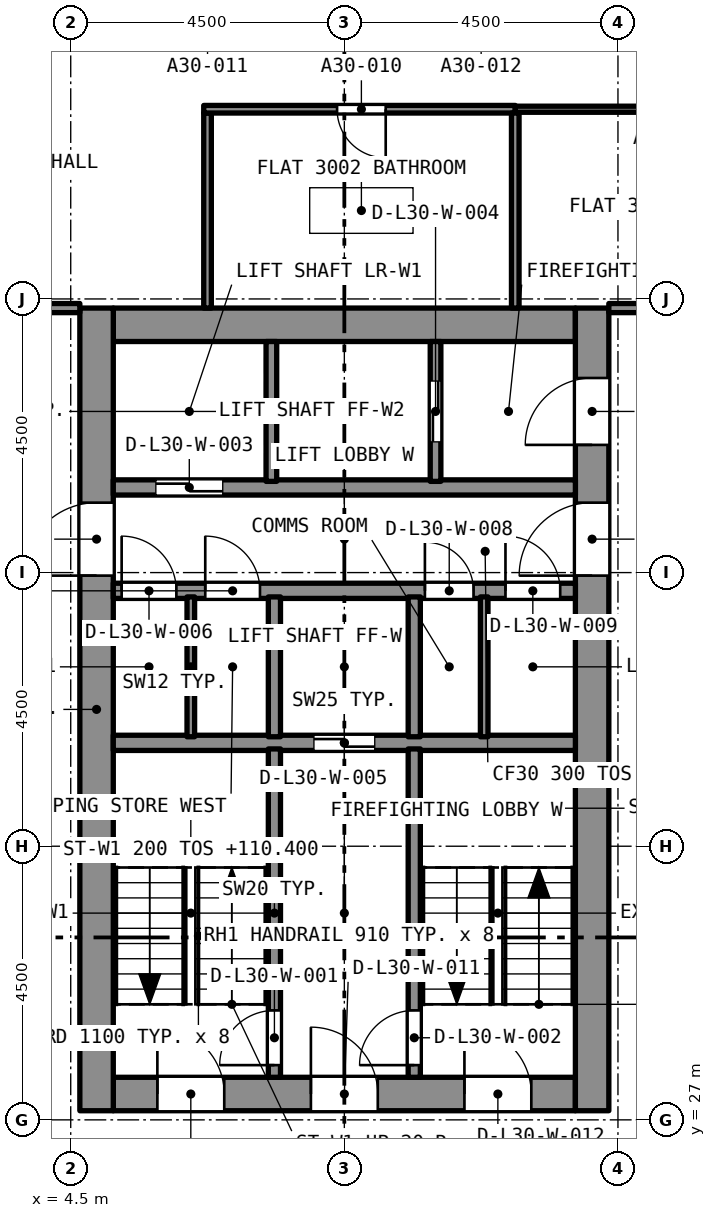
"""IFC4 building model, lengths in metres.
Left out: names, types, materials, properties, quantities, classifications, styles, units other than length and angle.
Written with IfcOpenShell. Run it as: python <this file> out.ifc"""

import sys

from ifc_helpers import new_model, si_unit, direction, frame, frame_2d, origin, place, context, subcontext, project, spatial, rectangle, extrude, element, fill, save


model = new_model("IFC4")
c1 = context("Model", 3, precision=1e-05, world=origin(), true_north=direction((0.0, 1.0)))
c2 = subcontext(c1, "Body", "Model", "MODEL_VIEW")
j1 = project(units=[si_unit("LENGTHUNIT", "METRE"), si_unit("PLANEANGLEUNIT", "RADIAN")], contexts=[c1])
p1 = place(None, origin())
s1 = spatial("IfcSite", under=j1, at=p1, CompositionType="ELEMENT")
p2 = place(p1, origin())
s2 = spatial("IfcBuilding", under=s1, at=p2, CompositionType="ELEMENT")
p3 = place(p2, frame((0.0, 0.0, 108.8)))
s3 = spatial("IfcBuildingStorey", under=s2, at=p3, CompositionType="ELEMENT", Elevation=108.8)
p4 = place(p3, frame((5.2, 27.425, 0.0), z_axis=(0.0, 0.0, 1.0), x_axis=(1.0, 0.0, 0.0)))
e1 = element("IfcWall", 1, at=p4, inside=s3, PredefinedType="SOLIDWALL", context=c2, shape_type="SweptSolid", body=[
    extrude(rectangle(XDim=7.6, YDim=0.55, at=frame_2d((3.8, 0.0))), origin(), (0.0, 0.0, 1.0), 3.2),
])
p5 = place(p4, frame((0.725, 0.0, 0.0)))
e2 = element("IfcOpeningElement", 2, at=p5, cuts=e1, PredefinedType="OPENING", context=c2, shape_type="SweptSolid", body=[
    extrude(rectangle(XDim=1.1, YDim=2.1, at=frame_2d((0.55, 1.05))), frame((0.0, 0.285, 0.0), z_axis=(0.0, -1.0, 0.0), x_axis=(1.0, 0.0, 0.0)), (0.0, 0.0, 1.0), 0.57),
])
p6 = place(p4, frame((3.25, 0.0, 0.0)))
e3 = element("IfcOpeningElement", 3, at=p6, cuts=e1, PredefinedType="OPENING", context=c2, shape_type="SweptSolid", body=[
    extrude(rectangle(XDim=1.1, YDim=2.1, at=frame_2d((0.55, 1.05))), frame((0.0, 0.285, 0.0), z_axis=(0.0, -1.0, 0.0), x_axis=(1.0, 0.0, 0.0)), (0.0, 0.0, 1.0), 0.57),
])
p7 = place(p4, frame((5.775, 0.0, 0.0)))
e4 = element("IfcOpeningElement", 4, at=p7, cuts=e1, PredefinedType="OPENING", context=c2, shape_type="SweptSolid", body=[
    extrude(rectangle(XDim=1.1, YDim=2.1, at=frame_2d((0.55, 1.05))), frame((0.0, 0.285, 0.0), z_axis=(0.0, -1.0, 0.0), x_axis=(1.0, 0.0, 0.0)), (0.0, 0.0, 1.0), 0.57),
])
p8 = place(p3, frame((5.2, 40.075, 0.0), z_axis=(0.0, 0.0, 1.0), x_axis=(1.0, 0.0, 0.0)))
e5 = element("IfcWall", 5, at=p8, inside=s3, PredefinedType="SOLIDWALL", context=c2, shape_type="SweptSolid", body=[
    extrude(rectangle(XDim=7.6, YDim=0.55, at=frame_2d((3.8, 0.0))), origin(), (0.0, 0.0, 1.0), 3.2),
])
p9 = place(p3, frame((4.925, 27.15, 0.0), z_axis=(0.0, 0.0, 1.0), x_axis=(0.0, 1.0, 0.0)))
e6 = element("IfcWall", 6, at=p9, inside=s3, PredefinedType="SOLIDWALL", context=c2, shape_type="SweptSolid", body=[
    extrude(rectangle(XDim=13.2, YDim=0.55, at=frame_2d((6.6, 0.0))), origin(), (0.0, 0.0, 1.0), 3.2),
])
p10 = place(p9, frame((8.8, 0.0, 0.0)))
e7 = element("IfcOpeningElement", 7, at=p10, cuts=e6, PredefinedType="OPENING", context=c2, shape_type="SweptSolid", body=[
    extrude(rectangle(XDim=1.2, YDim=2.1, at=frame_2d((0.6, 1.05))), frame((0.0, 0.285, 0.0), z_axis=(0.0, -1.0, 0.0), x_axis=(1.0, 0.0, 0.0)), (0.0, 0.0, 1.0), 0.57),
])
p11 = place(p3, frame((13.075, 27.15, 0.0), z_axis=(0.0, 0.0, 1.0), x_axis=(0.0, 1.0, 0.0)))
e8 = element("IfcWall", 8, at=p11, inside=s3, PredefinedType="SOLIDWALL", context=c2, shape_type="SweptSolid", body=[
    extrude(rectangle(XDim=13.2, YDim=0.55, at=frame_2d((6.6, 0.0))), origin(), (0.0, 0.0, 1.0), 3.2),
])
p12 = place(p11, frame((10.95, 0.0, 0.0)))
e9 = element("IfcOpeningElement", 9, at=p12, cuts=e8, PredefinedType="OPENING", context=c2, shape_type="SweptSolid", body=[
    extrude(rectangle(XDim=1.1, YDim=2.1, at=frame_2d((0.55, 1.05))), frame((0.0, 0.285, 0.0), z_axis=(0.0, -1.0, 0.0), x_axis=(1.0, 0.0, 0.0)), (0.0, 0.0, 1.0), 0.57),
])
p13 = place(p11, frame((8.8, 0.0, 0.0)))
e10 = element("IfcOpeningElement", 10, at=p13, cuts=e8, PredefinedType="OPENING", context=c2, shape_type="SweptSolid", body=[
    extrude(rectangle(XDim=1.2, YDim=2.1, at=frame_2d((0.6, 1.05))), frame((0.0, 0.285, 0.0), z_axis=(0.0, -1.0, 0.0), x_axis=(1.0, 0.0, 0.0)), (0.0, 0.0, 1.0), 0.57),
])
p14 = place(p3, frame((6.75, 40.35, 0.0), z_axis=(0.0, 0.0, 1.0), x_axis=(0.0, 1.0, 0.0)))
e11 = element("IfcWall", 11, at=p14, inside=s3, PredefinedType="PARTITIONING", context=c2, shape_type="SweptSolid", body=[
    extrude(rectangle(XDim=3.208, YDim=0.125, at=frame_2d((1.604, 0.0))), origin(), (0.0, 0.0, 1.0), 2.9),
])
p15 = place(p3, frame((11.811, 43.62, 0.0), z_axis=(0.0, 0.0, 1.0), x_axis=(-1.0, 0.0, 0.0)))
e12 = element("IfcWall", 12, at=p15, inside=s3, PredefinedType="PARTITIONING", context=c2, shape_type="SweptSolid", body=[
    extrude(rectangle(XDim=5.123, YDim=0.125, at=frame_2d((2.562, 0.0))), origin(), (0.0, 0.0, 1.0), 2.9),
])
p16 = place(p15, frame((2.13, 0.0, 0.0)))
e13 = element("IfcOpeningElement", 13, at=p16, cuts=e12, PredefinedType="OPENING", context=c2, shape_type="SweptSolid", body=[
    extrude(rectangle(XDim=0.8, YDim=2.1, at=frame_2d((0.4, 1.05))), frame((0.0, 0.073, 0.0), z_axis=(0.0, -1.0, 0.0), x_axis=(1.0, 0.0, 0.0)), (0.0, 0.0, 1.0), 0.145),
])
p17 = place(p3, frame((11.811, 40.35, 0.0), z_axis=(0.0, 0.0, 1.0), x_axis=(0.0, 1.0, 0.0)))
e14 = element("IfcWall", 14, at=p17, inside=s3, PredefinedType="PARTITIONING", context=c2, shape_type="SweptSolid", body=[
    extrude(rectangle(XDim=3.208, YDim=0.125, at=frame_2d((1.604, 0.0))), origin(), (0.0, 0.0, 1.0), 2.9),
])
p18 = place(p3, frame((17.875, 43.62, 0.0), z_axis=(0.0, 0.0, 1.0), x_axis=(-1.0, 0.0, 0.0)))
e15 = element("IfcWall", 15, at=p18, inside=s3, PredefinedType="PARTITIONING", context=c2, shape_type="SweptSolid", body=[
    extrude(rectangle(XDim=6.064, YDim=0.1, at=frame_2d((3.032, 0.0))), origin(), (0.0, 0.0, 1.0), 2.9),
])
p19 = place(p18, frame((2.52, 0.0, 0.0)))
e16 = element("IfcOpeningElement", 16, at=p19, cuts=e15, PredefinedType="OPENING", context=c2, shape_type="SweptSolid", body=[
    extrude(rectangle(XDim=0.9, YDim=2.1, at=frame_2d((0.45, 1.05))), frame((0.0, 0.06, 0.0), z_axis=(0.0, -1.0, 0.0), x_axis=(1.0, 0.0, 0.0)), (0.0, 0.0, 1.0), 0.12),
])
p20 = place(p3, frame((0.575, 40.35, 0.0), z_axis=(0.0, 0.0, 1.0), x_axis=(1.0, 0.0, 0.0)))
e17 = element("IfcWall", 17, at=p20, inside=s3, PredefinedType="PARTITIONING", context=c2, shape_type="SweptSolid", body=[
    extrude(rectangle(XDim=4.075, YDim=0.15, at=frame_2d((2.038, 0.0))), origin(), (0.0, 0.0, 1.0), 2.9),
])
p21 = place(p20, frame((1.175, 0.0, 0.0)))
e18 = element("IfcOpeningElement", 18, at=p21, cuts=e17, PredefinedType="OPENING", context=c2, shape_type="SweptSolid", body=[
    extrude(rectangle(XDim=1.0, YDim=2.1, at=frame_2d((0.5, 1.05))), frame((0.0, 0.085, 0.0), z_axis=(0.0, -1.0, 0.0), x_axis=(1.0, 0.0, 0.0)), (0.0, 0.0, 1.0), 0.17),
])
p22 = place(p3, frame((13.35, 40.35, 0.0), z_axis=(0.0, 0.0, 1.0), x_axis=(1.0, 0.0, 0.0)))
e19 = element("IfcWall", 19, at=p22, inside=s3, PredefinedType="PARTITIONING", context=c2, shape_type="SweptSolid", body=[
    extrude(rectangle(XDim=4.075, YDim=0.15, at=frame_2d((2.038, 0.0))), origin(), (0.0, 0.0, 1.0), 2.9),
])
p23 = place(p3, frame((5.2, 33.2, 0.0), z_axis=(0.0, 0.0, 1.0), x_axis=(1.0, 0.0, 0.0)))
e20 = element("IfcWall", 20, at=p23, inside=s3, PredefinedType="SOLIDWALL", context=c2, shape_type="SweptSolid", body=[
    extrude(rectangle(XDim=7.6, YDim=0.25, at=frame_2d((3.8, 0.0))), origin(), (0.0, 0.0, 1.0), 2.9),
])
p24 = place(p23, frame((3.3, 0.0, 0.0)))
e21 = element("IfcOpeningElement", 21, at=p24, cuts=e20, PredefinedType="OPENING", context=c2, shape_type="SweptSolid", body=[
    extrude(rectangle(XDim=1.0, YDim=2.1, at=frame_2d((0.5, 1.05))), frame((0.0, 0.135, 0.0), z_axis=(0.0, -1.0, 0.0), x_axis=(1.0, 0.0, 0.0)), (0.0, 0.0, 1.0), 0.27),
])
p25 = place(p3, frame((5.2, 35.7, 0.0), z_axis=(0.0, 0.0, 1.0), x_axis=(1.0, 0.0, 0.0)))
e22 = element("IfcWall", 22, at=p25, inside=s3, PredefinedType="SOLIDWALL", context=c2, shape_type="SweptSolid", body=[
    extrude(rectangle(XDim=7.6, YDim=0.25, at=frame_2d((3.8, 0.0))), origin(), (0.0, 0.0, 1.0), 2.9),
])
p26 = place(p25, frame((0.137, 0.0, 0.0)))
e23 = element("IfcOpeningElement", 23, at=p26, cuts=e22, PredefinedType="OPENING", context=c2, shape_type="SweptSolid", body=[
    extrude(rectangle(XDim=0.9, YDim=2.1, at=frame_2d((0.45, 1.05))), frame((0.0, 0.135, 0.0), z_axis=(0.0, -1.0, 0.0), x_axis=(1.0, 0.0, 0.0)), (0.0, 0.0, 1.0), 0.27),
])
p27 = place(p25, frame((1.512, 0.0, 0.0)))
e24 = element("IfcOpeningElement", 24, at=p27, cuts=e22, PredefinedType="OPENING", context=c2, shape_type="SweptSolid", body=[
    extrude(rectangle(XDim=0.9, YDim=2.1, at=frame_2d((0.45, 1.05))), frame((0.0, 0.135, 0.0), z_axis=(0.0, -1.0, 0.0), x_axis=(1.0, 0.0, 0.0)), (0.0, 0.0, 1.0), 0.27),
])
p28 = place(p25, frame((5.125, 0.0, 0.0)))
e25 = element("IfcOpeningElement", 25, at=p28, cuts=e22, PredefinedType="OPENING", context=c2, shape_type="SweptSolid", body=[
    extrude(rectangle(XDim=0.8, YDim=2.1, at=frame_2d((0.4, 1.05))), frame((0.0, 0.135, 0.0), z_axis=(0.0, -1.0, 0.0), x_axis=(1.0, 0.0, 0.0)), (0.0, 0.0, 1.0), 0.27),
])
p29 = place(p25, frame((6.45, 0.0, 0.0)))
e26 = element("IfcOpeningElement", 26, at=p29, cuts=e22, PredefinedType="OPENING", context=c2, shape_type="SweptSolid", body=[
    extrude(rectangle(XDim=0.9, YDim=2.1, at=frame_2d((0.45, 1.05))), frame((0.0, 0.135, 0.0), z_axis=(0.0, -1.0, 0.0), x_axis=(1.0, 0.0, 0.0)), (0.0, 0.0, 1.0), 0.27),
])
p30 = place(p3, frame((5.2, 37.4, 0.0), z_axis=(0.0, 0.0, 1.0), x_axis=(1.0, 0.0, 0.0)))
e27 = element("IfcWall", 27, at=p30, inside=s3, PredefinedType="SOLIDWALL", context=c2, shape_type="SweptSolid", body=[
    extrude(rectangle(XDim=7.6, YDim=0.25, at=frame_2d((3.8, 0.0))), origin(), (0.0, 0.0, 1.0), 2.9),
])
p31 = place(p30, frame((0.7, 0.0, 0.0)))
e28 = element("IfcOpeningElement", 28, at=p31, cuts=e27, PredefinedType="OPENING", context=c2, shape_type="SweptSolid", body=[
    extrude(rectangle(XDim=1.1, YDim=2.4, at=frame_2d((0.55, 1.2))), frame((0.0, 0.135, 0.0), z_axis=(0.0, -1.0, 0.0), x_axis=(1.0, 0.0, 0.0)), (0.0, 0.0, 1.0), 0.27),
])
p32 = place(p3, frame((7.85, 27.7, 0.0), z_axis=(0.0, 0.0, 1.0), x_axis=(0.0, 1.0, 0.0)))
e29 = element("IfcWall", 29, at=p32, inside=s3, PredefinedType="SOLIDWALL", context=c2, shape_type="SweptSolid", body=[
    extrude(rectangle(XDim=5.4, YDim=0.2, at=frame_2d((2.7, 0.0))), origin(), (0.0, 0.0, 1.0), 2.9),
])
p33 = place(p32, frame((0.2, 0.0, 0.0)))
e30 = element("IfcOpeningElement", 30, at=p33, cuts=e29, PredefinedType="OPENING", context=c2, shape_type="SweptSolid", body=[
    extrude(rectangle(XDim=0.9, YDim=2.1, at=frame_2d((0.45, 1.05))), frame((0.0, 0.11, 0.0), z_axis=(0.0, -1.0, 0.0), x_axis=(1.0, 0.0, 0.0)), (0.0, 0.0, 1.0), 0.22),
])
p34 = place(p3, frame((10.15, 27.7, 0.0), z_axis=(0.0, 0.0, 1.0), x_axis=(0.0, 1.0, 0.0)))
e31 = element("IfcWall", 31, at=p34, inside=s3, PredefinedType="SOLIDWALL", context=c2, shape_type="SweptSolid", body=[
    extrude(rectangle(XDim=5.4, YDim=0.2, at=frame_2d((2.7, 0.0))), origin(), (0.0, 0.0, 1.0), 2.9),
])
p35 = place(p34, frame((0.2, 0.0, 0.0)))
e32 = element("IfcOpeningElement", 32, at=p35, cuts=e31, PredefinedType="OPENING", context=c2, shape_type="SweptSolid", body=[
    extrude(rectangle(XDim=0.9, YDim=2.1, at=frame_2d((0.45, 1.05))), frame((0.0, 0.11, 0.0), z_axis=(0.0, -1.0, 0.0), x_axis=(1.0, 0.0, 0.0)), (0.0, 0.0, 1.0), 0.22),
])
for number, where, z_axis, x_axis in (
    (33, (7.85, 33.3, 0.0), (0.0, 0.0, 1.0), (0.0, 1.0, 0.0)),
    (34, (10.15, 33.3, 0.0), (0.0, 0.0, 1.0), (0.0, 1.0, 0.0)),
):
    element("IfcWall", number, at=place(p3, frame(where, z_axis=z_axis, x_axis=x_axis)), inside=s3, PredefinedType="SOLIDWALL", context=c2, shape_type="SweptSolid", body=[
        extrude(rectangle(XDim=2.3, YDim=0.2, at=frame_2d((1.15, 0.0))), origin(), (0.0, 0.0, 1.0), 2.9),
    ])
p36 = place(p3, frame((7.8, 37.5, 0.0), z_axis=(0.0, 0.0, 1.0), x_axis=(0.0, 1.0, 0.0)))
e35 = element("IfcWall", 35, at=p36, inside=s3, PredefinedType="SOLIDWALL", context=c2, shape_type="SweptSolid", body=[
    extrude(rectangle(XDim=2.3, YDim=0.175, at=frame_2d((1.15, 0.0))), origin(), (0.0, 0.0, 1.0), 2.9),
])
p37 = place(p3, frame((10.5, 37.5, 0.0), z_axis=(0.0, 0.0, 1.0), x_axis=(0.0, 1.0, 0.0)))
e36 = element("IfcWall", 36, at=p37, inside=s3, PredefinedType="SOLIDWALL", context=c2, shape_type="SweptSolid", body=[
    extrude(rectangle(XDim=2.3, YDim=0.175, at=frame_2d((1.15, 0.0))), origin(), (0.0, 0.0, 1.0), 2.9),
])
p38 = place(p37, frame((0.65, 0.0, 0.0)))
e37 = element("IfcOpeningElement", 37, at=p38, cuts=e36, PredefinedType="OPENING", context=c2, shape_type="SweptSolid", body=[
    extrude(rectangle(XDim=1.0, YDim=2.1, at=frame_2d((0.5, 1.05))), frame((0.0, 0.097, 0.0), z_axis=(0.0, -1.0, 0.0), x_axis=(1.0, 0.0, 0.0)), (0.0, 0.0, 1.0), 0.195),
])
for number, where, z_axis, x_axis in (
    (38, (6.475, 33.3, 0.0), (0.0, 0.0, 1.0), (0.0, 1.0, 0.0)),
    (39, (11.3, 33.3, 0.0), (0.0, 0.0, 1.0), (0.0, 1.0, 0.0)),
):
    element("IfcWall", number, at=place(p3, frame(where, z_axis=z_axis, x_axis=x_axis)), inside=s3, PredefinedType="PARTITIONING", context=c2, shape_type="SweptSolid", body=[
        extrude(rectangle(XDim=2.3, YDim=0.125, at=frame_2d((1.15, 0.0))), origin(), (0.0, 0.0, 1.0), 2.9),
    ])
p39 = place(p16, origin())
e40 = element("IfcDoor", 40, at=p39, inside=s3, OperationType="SINGLE_SWING_LEFT", PredefinedType="DOOR", context=c2, shape_type="SweptSolid", body=[
    extrude(rectangle(XDim=0.8, YDim=2.1, at=frame_2d((0.4, 1.05))), frame((0.0, 0.025, 0.0), z_axis=(0.0, -1.0, 0.0), x_axis=(1.0, 0.0, 0.0)), (0.0, 0.0, 1.0), 0.05),
])
fill(e13, e40)
p40 = place(p33, origin())
e41 = element("IfcDoor", 41, at=p40, inside=s3, OperationType="SINGLE_SWING_LEFT", PredefinedType="DOOR", context=c2, shape_type="SweptSolid", body=[
    extrude(rectangle(XDim=0.9, YDim=2.1, at=frame_2d((0.45, 1.05))), frame((0.0, 0.025, 0.0), z_axis=(0.0, -1.0, 0.0), x_axis=(1.0, 0.0, 0.0)), (0.0, 0.0, 1.0), 0.05),
])
fill(e30, e41)
p41 = place(p35, origin())
e42 = element("IfcDoor", 42, at=p41, inside=s3, OperationType="SINGLE_SWING_LEFT", PredefinedType="DOOR", context=c2, shape_type="SweptSolid", body=[
    extrude(rectangle(XDim=0.9, YDim=2.1, at=frame_2d((0.45, 1.05))), frame((0.0, 0.025, 0.0), z_axis=(0.0, -1.0, 0.0), x_axis=(1.0, 0.0, 0.0)), (0.0, 0.0, 1.0), 0.05),
])
fill(e32, e42)
p42 = place(p31, origin())
e43 = element("IfcDoor", 43, at=p42, inside=s3, OperationType="SLIDING_TO_LEFT", PredefinedType="DOOR", context=c2, shape_type="SweptSolid", body=[
    extrude(rectangle(XDim=1.1, YDim=2.4, at=frame_2d((0.55, 1.2))), frame((0.0, 0.025, 0.0), z_axis=(0.0, -1.0, 0.0), x_axis=(1.0, 0.0, 0.0)), (0.0, 0.0, 1.0), 0.05),
])
fill(e28, e43)
p43 = place(p38, origin())
e44 = element("IfcDoor", 44, at=p43, inside=s3, OperationType="SLIDING_TO_LEFT", PredefinedType="DOOR", context=c2, shape_type="SweptSolid", body=[
    extrude(rectangle(XDim=1.0, YDim=2.1, at=frame_2d((0.5, 1.05))), frame((0.0, 0.025, 0.0), z_axis=(0.0, -1.0, 0.0), x_axis=(1.0, 0.0, 0.0)), (0.0, 0.0, 1.0), 0.05),
])
fill(e37, e44)
p44 = place(p24, origin())
e45 = element("IfcDoor", 45, at=p44, inside=s3, OperationType="SLIDING_TO_LEFT", PredefinedType="DOOR", context=c2, shape_type="SweptSolid", body=[
    extrude(rectangle(XDim=1.0, YDim=2.1, at=frame_2d((0.5, 1.05))), frame((0.0, 0.025, 0.0), z_axis=(0.0, -1.0, 0.0), x_axis=(1.0, 0.0, 0.0)), (0.0, 0.0, 1.0), 0.05),
])
fill(e21, e45)
p45 = place(p26, origin())
e46 = element("IfcDoor", 46, at=p45, inside=s3, OperationType="SINGLE_SWING_LEFT", PredefinedType="DOOR", context=c2, shape_type="SweptSolid", body=[
    extrude(rectangle(XDim=0.9, YDim=2.1, at=frame_2d((0.45, 1.05))), frame((0.0, 0.025, 0.0), z_axis=(0.0, -1.0, 0.0), x_axis=(1.0, 0.0, 0.0)), (0.0, 0.0, 1.0), 0.05),
])
fill(e23, e46)
p46 = place(p27, origin())
e47 = element("IfcDoor", 47, at=p46, inside=s3, OperationType="SINGLE_SWING_LEFT", PredefinedType="DOOR", context=c2, shape_type="SweptSolid", body=[
    extrude(rectangle(XDim=0.9, YDim=2.1, at=frame_2d((0.45, 1.05))), frame((0.0, 0.025, 0.0), z_axis=(0.0, -1.0, 0.0), x_axis=(1.0, 0.0, 0.0)), (0.0, 0.0, 1.0), 0.05),
])
fill(e24, e47)
p47 = place(p28, origin())
e48 = element("IfcDoor", 48, at=p47, inside=s3, OperationType="SINGLE_SWING_LEFT", PredefinedType="DOOR", context=c2, shape_type="SweptSolid", body=[
    extrude(rectangle(XDim=0.8, YDim=2.1, at=frame_2d((0.4, 1.05))), frame((0.0, 0.025, 0.0), z_axis=(0.0, -1.0, 0.0), x_axis=(1.0, 0.0, 0.0)), (0.0, 0.0, 1.0), 0.05),
])
fill(e25, e48)
p48 = place(p29, origin())
e49 = element("IfcDoor", 49, at=p48, inside=s3, OperationType="SINGLE_SWING_LEFT", PredefinedType="DOOR", context=c2, shape_type="SweptSolid", body=[
    extrude(rectangle(XDim=0.9, YDim=2.1, at=frame_2d((0.45, 1.05))), frame((0.0, 0.025, 0.0), z_axis=(0.0, -1.0, 0.0), x_axis=(1.0, 0.0, 0.0)), (0.0, 0.0, 1.0), 0.05),
])
fill(e26, e49)
p49 = place(p5, origin())
e50 = element("IfcDoor", 50, at=p49, inside=s3, OperationType="SINGLE_SWING_LEFT", PredefinedType="DOOR", context=c2, shape_type="SweptSolid", body=[
    extrude(rectangle(XDim=1.1, YDim=2.1, at=frame_2d((0.55, 1.05))), frame((0.0, 0.025, 0.0), z_axis=(0.0, -1.0, 0.0), x_axis=(1.0, 0.0, 0.0)), (0.0, 0.0, 1.0), 0.05),
])
fill(e2, e50)
p50 = place(p6, origin())
e51 = element("IfcDoor", 51, at=p50, inside=s3, OperationType="SINGLE_SWING_LEFT", PredefinedType="DOOR", context=c2, shape_type="SweptSolid", body=[
    extrude(rectangle(XDim=1.1, YDim=2.1, at=frame_2d((0.55, 1.05))), frame((0.0, 0.025, 0.0), z_axis=(0.0, -1.0, 0.0), x_axis=(1.0, 0.0, 0.0)), (0.0, 0.0, 1.0), 0.05),
])
fill(e3, e51)
p51 = place(p7, origin())
e52 = element("IfcDoor", 52, at=p51, inside=s3, OperationType="SINGLE_SWING_LEFT", PredefinedType="DOOR", context=c2, shape_type="SweptSolid", body=[
    extrude(rectangle(XDim=1.1, YDim=2.1, at=frame_2d((0.55, 1.05))), frame((0.0, 0.025, 0.0), z_axis=(0.0, -1.0, 0.0), x_axis=(1.0, 0.0, 0.0)), (0.0, 0.0, 1.0), 0.05),
])
fill(e4, e52)
p52 = place(p12, origin())
e53 = element("IfcDoor", 53, at=p52, inside=s3, OperationType="SINGLE_SWING_LEFT", PredefinedType="DOOR", context=c2, shape_type="SweptSolid", body=[
    extrude(rectangle(XDim=1.1, YDim=2.1, at=frame_2d((0.55, 1.05))), frame((0.0, 0.025, 0.0), z_axis=(0.0, -1.0, 0.0), x_axis=(1.0, 0.0, 0.0)), (0.0, 0.0, 1.0), 0.05),
])
fill(e9, e53)
p53 = place(p10, origin())
e54 = element("IfcDoor", 54, at=p53, inside=s3, OperationType="SINGLE_SWING_LEFT", PredefinedType="DOOR", context=c2, shape_type="SweptSolid", body=[
    extrude(rectangle(XDim=1.2, YDim=2.1, at=frame_2d((0.6, 1.05))), frame((0.0, 0.025, 0.0), z_axis=(0.0, -1.0, 0.0), x_axis=(1.0, 0.0, 0.0)), (0.0, 0.0, 1.0), 0.05),
])
fill(e7, e54)
p54 = place(p13, origin())
e55 = element("IfcDoor", 55, at=p54, inside=s3, OperationType="SINGLE_SWING_LEFT", PredefinedType="DOOR", context=c2, shape_type="SweptSolid", body=[
    extrude(rectangle(XDim=1.2, YDim=2.1, at=frame_2d((0.6, 1.05))), frame((0.0, 0.025, 0.0), z_axis=(0.0, -1.0, 0.0), x_axis=(1.0, 0.0, 0.0)), (0.0, 0.0, 1.0), 0.05),
])
fill(e10, e55)
save(model, sys.argv[1])
